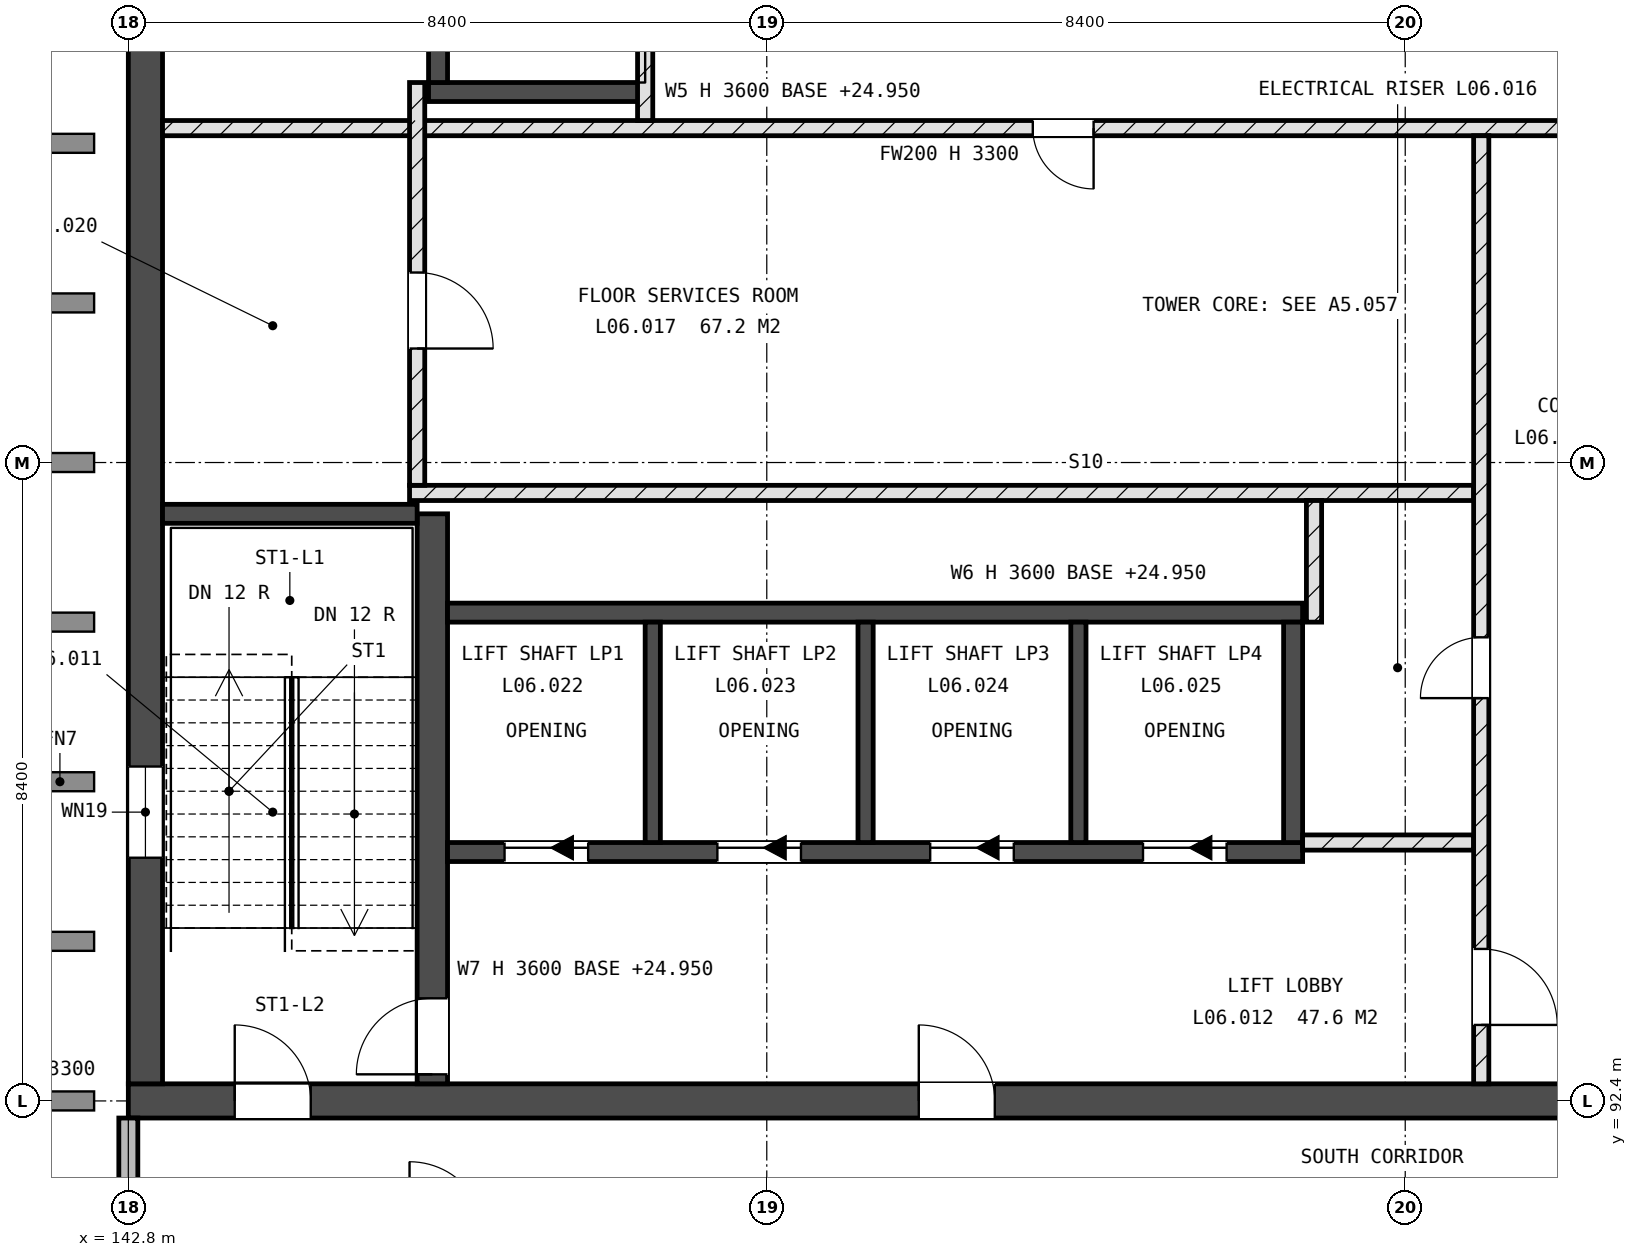
"""IFC4 building model, lengths in metres.
Left out: names, types, materials, properties, quantities, classifications, styles, units other than length and angle.
Written with IfcOpenShell. Run it as: python <this file> out.ifc"""

import sys

from ifc_helpers import new_model, si_unit, direction, frame, frame_2d, origin, place, context, subcontext, project, spatial, rectangle, extrude, element, fill, save


model = new_model("IFC4")
c1 = context("Model", 3, precision=1e-05, world=origin(), true_north=direction((0.0, 1.0)))
c2 = subcontext(c1, "Body", "Model", "MODEL_VIEW")
j1 = project(units=[si_unit("LENGTHUNIT", "METRE"), si_unit("PLANEANGLEUNIT", "RADIAN")], contexts=[c1])
p1 = place(None, origin())
s1 = spatial("IfcSite", under=j1, at=p1, CompositionType="ELEMENT")
p2 = place(p1, origin())
s2 = spatial("IfcBuilding", under=s1, at=p2, CompositionType="ELEMENT")
p3 = place(p2, frame((0.0, 0.0, 25.2)))
s3 = spatial("IfcBuildingStorey", under=s2, at=p3, CompositionType="ELEMENT", Elevation=25.2)
p4 = place(p3, frame((142.8, 92.4, -0.25), z_axis=(0.0, 0.0, 1.0), x_axis=(1.0, 0.0, 0.0)))
e1 = element("IfcWall", 1, at=p4, inside=s3, PredefinedType="SHEAR", context=c2, shape_type="SweptSolid", body=[
    extrude(rectangle(XDim=25.2, YDim=0.45, at=frame_2d((12.6, 0.0))), origin(), (0.0, 0.0, 1.0), 3.6),
])
p5 = place(p4, frame((1.4, 0.0, 0.25)))
e2 = element("IfcOpeningElement", 2, at=p5, cuts=e1, PredefinedType="OPENING", context=c2, shape_type="SweptSolid", body=[
    extrude(rectangle(XDim=1.0, YDim=2.1, at=frame_2d((0.5, 1.05))), frame((0.0, 0.235, 0.0), z_axis=(0.0, -1.0, 0.0), x_axis=(1.0, 0.0, 0.0)), (0.0, 0.0, 1.0), 0.47),
])
p6 = place(p4, frame((19.1, 0.0, 0.25)))
e3 = element("IfcOpeningElement", 3, at=p6, cuts=e1, PredefinedType="OPENING", context=c2, shape_type="SweptSolid", body=[
    extrude(rectangle(XDim=1.0, YDim=2.1, at=frame_2d((0.5, 1.05))), frame((0.0, 0.235, 0.0), z_axis=(0.0, -1.0, 0.0), x_axis=(1.0, 0.0, 0.0)), (0.0, 0.0, 1.0), 0.47),
])
p7 = place(p4, frame((10.4, 0.0, 0.25)))
e4 = element("IfcOpeningElement", 4, at=p7, cuts=e1, PredefinedType="OPENING", context=c2, shape_type="SweptSolid", body=[
    extrude(rectangle(XDim=1.0, YDim=2.1, at=frame_2d((0.5, 1.05))), frame((0.0, 0.235, 0.0), z_axis=(0.0, -1.0, 0.0), x_axis=(1.0, 0.0, 0.0)), (0.0, 0.0, 1.0), 0.47),
])
p8 = place(p3, frame((143.025, 92.625, -0.25), z_axis=(0.0, 0.0, 1.0), x_axis=(0.0, 1.0, 0.0)))
e5 = element("IfcWall", 5, at=p8, inside=s3, PredefinedType="SHEAR", context=c2, shape_type="SweptSolid", body=[
    extrude(rectangle(XDim=16.35, YDim=0.45, at=frame_2d((8.175, 0.0))), origin(), (0.0, 0.0, 1.0), 3.6),
])
p9 = place(p8, frame((2.975, 0.0, 1.85)))
e6 = element("IfcOpeningElement", 6, at=p9, cuts=e5, PredefinedType="OPENING", context=c2, shape_type="SweptSolid", body=[
    extrude(rectangle(XDim=1.2, YDim=0.9, at=frame_2d((0.6, 0.45))), frame((0.0, 0.235, 0.0), z_axis=(0.0, -1.0, 0.0), x_axis=(1.0, 0.0, 0.0)), (0.0, 0.0, 1.0), 0.47),
])
p10 = place(p3, frame((146.8, 92.625, -0.25), z_axis=(0.0, 0.0, 1.0), x_axis=(0.0, 1.0, 0.0)))
e7 = element("IfcWall", 7, at=p10, inside=s3, PredefinedType="SHEAR", context=c2, shape_type="SweptSolid", body=[
    extrude(rectangle(XDim=7.5, YDim=0.4, at=frame_2d((3.75, 0.0))), origin(), (0.0, 0.0, 1.0), 3.6),
])
p11 = place(p10, frame((0.125, 0.0, 0.25)))
e8 = element("IfcOpeningElement", 8, at=p11, cuts=e7, PredefinedType="OPENING", context=c2, shape_type="SweptSolid", body=[
    extrude(rectangle(XDim=1.0, YDim=2.1, at=frame_2d((0.5, 1.05))), frame((0.0, 0.21, 0.0), z_axis=(0.0, -1.0, 0.0), x_axis=(1.0, 0.0, 0.0)), (0.0, 0.0, 1.0), 0.42),
])
p12 = place(p3, frame((143.25, 100.125, -0.25), z_axis=(0.0, 0.0, 1.0), x_axis=(1.0, 0.0, 0.0)))
e9 = element("IfcWall", 9, at=p12, inside=s3, PredefinedType="SHEAR", context=c2, shape_type="SweptSolid", body=[
    extrude(rectangle(XDim=3.35, YDim=0.25, at=frame_2d((1.675, 0.0))), origin(), (0.0, 0.0, 1.0), 3.6),
])
p13 = place(p3, frame((147.0, 95.675, -0.25), z_axis=(0.0, 0.0, 1.0), x_axis=(1.0, 0.0, 0.0)))
e10 = element("IfcWall", 10, at=p13, inside=s3, PredefinedType="SHEAR", context=c2, shape_type="SweptSolid", body=[
    extrude(rectangle(XDim=11.25, YDim=0.25, at=frame_2d((5.625, 0.0))), origin(), (0.0, 0.0, 1.0), 3.6),
])
p14 = place(p13, frame((0.75, 0.0, 0.25)))
e11 = element("IfcOpeningElement", 11, at=p14, cuts=e10, PredefinedType="OPENING", context=c2, shape_type="SweptSolid", body=[
    extrude(rectangle(XDim=1.1, YDim=2.1, at=frame_2d((0.55, 1.05))), frame((0.0, 0.135, 0.0), z_axis=(0.0, -1.0, 0.0), x_axis=(1.0, 0.0, 0.0)), (0.0, 0.0, 1.0), 0.27),
])
p15 = place(p13, frame((3.55, 0.0, 0.25)))
e12 = element("IfcOpeningElement", 12, at=p15, cuts=e10, PredefinedType="OPENING", context=c2, shape_type="SweptSolid", body=[
    extrude(rectangle(XDim=1.1, YDim=2.1, at=frame_2d((0.55, 1.05))), frame((0.0, 0.135, 0.0), z_axis=(0.0, -1.0, 0.0), x_axis=(1.0, 0.0, 0.0)), (0.0, 0.0, 1.0), 0.27),
])
p16 = place(p13, frame((6.35, 0.0, 0.25)))
e13 = element("IfcOpeningElement", 13, at=p16, cuts=e10, PredefinedType="OPENING", context=c2, shape_type="SweptSolid", body=[
    extrude(rectangle(XDim=1.1, YDim=2.1, at=frame_2d((0.55, 1.05))), frame((0.0, 0.135, 0.0), z_axis=(0.0, -1.0, 0.0), x_axis=(1.0, 0.0, 0.0)), (0.0, 0.0, 1.0), 0.27),
])
p17 = place(p13, frame((9.15, 0.0, 0.25)))
e14 = element("IfcOpeningElement", 14, at=p17, cuts=e10, PredefinedType="OPENING", context=c2, shape_type="SweptSolid", body=[
    extrude(rectangle(XDim=1.1, YDim=2.1, at=frame_2d((0.55, 1.05))), frame((0.0, 0.135, 0.0), z_axis=(0.0, -1.0, 0.0), x_axis=(1.0, 0.0, 0.0)), (0.0, 0.0, 1.0), 0.27),
])
p18 = place(p3, frame((147.0, 98.825, -0.25), z_axis=(0.0, 0.0, 1.0), x_axis=(1.0, 0.0, 0.0)))
e15 = element("IfcWall", 15, at=p18, inside=s3, PredefinedType="SHEAR", context=c2, shape_type="SweptSolid", body=[
    extrude(rectangle(XDim=11.25, YDim=0.25, at=frame_2d((5.625, 0.0))), origin(), (0.0, 0.0, 1.0), 3.6),
])
p19 = place(p3, frame((158.125, 95.8, -0.25), z_axis=(0.0, 0.0, 1.0), x_axis=(0.0, 1.0, 0.0)))
e16 = element("IfcWall", 16, at=p19, inside=s3, PredefinedType="SHEAR", context=c2, shape_type="SweptSolid", body=[
    extrude(rectangle(XDim=2.9, YDim=0.25, at=frame_2d((1.45, 0.0))), origin(), (0.0, 0.0, 1.0), 3.6),
])
for number, where, z_axis, x_axis in (
    (17, (149.7, 95.8, -0.25), (0.0, 0.0, 1.0), (0.0, 1.0, 0.0)),
    (18, (152.5, 95.8, -0.25), (0.0, 0.0, 1.0), (0.0, 1.0, 0.0)),
    (19, (155.3, 95.8, -0.25), (0.0, 0.0, 1.0), (0.0, 1.0, 0.0)),
):
    element("IfcWall", number, at=place(p3, frame(where, z_axis=z_axis, x_axis=x_axis)), inside=s3, PredefinedType="SHEAR", context=c2, shape_type="SweptSolid", body=[
        extrude(rectangle(XDim=2.9, YDim=0.2, at=frame_2d((1.45, 0.0))), origin(), (0.0, 0.0, 1.0), 3.6),
    ])
p20 = place(p3, frame((146.75, 105.675, -0.25), z_axis=(0.0, 0.0, 1.0), x_axis=(1.0, 0.0, 0.0)))
e20 = element("IfcWall", 20, at=p20, inside=s3, PredefinedType="SHEAR", context=c2, shape_type="SweptSolid", body=[
    extrude(rectangle(XDim=2.85, YDim=0.25, at=frame_2d((1.425, 0.0))), origin(), (0.0, 0.0, 1.0), 3.6),
])
p21 = place(p3, frame((146.875, 105.8, -0.25), z_axis=(0.0, 0.0, 1.0), x_axis=(0.0, 1.0, 0.0)))
e21 = element("IfcWall", 21, at=p21, inside=s3, PredefinedType="SHEAR", context=c2, shape_type="SweptSolid", body=[
    extrude(rectangle(XDim=2.9, YDim=0.25, at=frame_2d((1.45, 0.0))), origin(), (0.0, 0.0, 1.0), 3.6),
])
p22 = place(p3, frame((142.8, 84.45, 0.0), z_axis=(0.0, 0.0, 1.0), x_axis=(0.0, 1.0, 0.0)))
e22 = element("IfcWall", 22, at=p22, inside=s3, PredefinedType="STANDARD", context=c2, shape_type="SweptSolid", body=[
    extrude(rectangle(XDim=7.725, YDim=0.25, at=frame_2d((3.863, 0.0))), origin(), (0.0, 0.0, 1.0), 3.3),
])
p23 = place(p22, frame((2.25, 0.0, 2.1)))
e23 = element("IfcOpeningElement", 23, at=p23, cuts=e22, PredefinedType="OPENING", context=c2, shape_type="SweptSolid", body=[
    extrude(rectangle(XDim=0.9, YDim=0.6, at=frame_2d((0.45, 0.3))), frame((0.0, 0.135, 0.0), z_axis=(0.0, -1.0, 0.0), x_axis=(1.0, 0.0, 0.0)), (0.0, 0.0, 1.0), 0.27),
])
p24 = place(p3, frame((158.25, 95.8, 0.0), z_axis=(0.0, 0.0, 1.0), x_axis=(1.0, 0.0, 0.0)))
e24 = element("IfcWall", 24, at=p24, inside=s3, PredefinedType="SOLIDWALL", context=c2, shape_type="SweptSolid", body=[
    extrude(rectangle(XDim=2.25, YDim=0.2, at=frame_2d((1.125, 0.0))), origin(), (0.0, 0.0, 1.0), 3.3),
])
p25 = place(p3, frame((146.5, 100.4, 0.0), z_axis=(0.0, 0.0, 1.0), x_axis=(1.0, 0.0, 0.0)))
e25 = element("IfcWall", 25, at=p25, inside=s3, PredefinedType="SOLIDWALL", context=c2, shape_type="SweptSolid", body=[
    extrude(rectangle(XDim=14.0, YDim=0.2, at=frame_2d((7.0, 0.0))), origin(), (0.0, 0.0, 1.0), 3.3),
])
p26 = place(p3, frame((143.25, 105.2, 0.0), z_axis=(0.0, 0.0, 1.0), x_axis=(1.0, 0.0, 0.0)))
e26 = element("IfcWall", 26, at=p26, inside=s3, PredefinedType="SOLIDWALL", context=c2, shape_type="SweptSolid", body=[
    extrude(rectangle(XDim=20.7, YDim=0.2, at=frame_2d((10.35, 0.0))), origin(), (0.0, 0.0, 1.0), 3.3),
])
p27 = place(p26, frame((11.45, 0.0, 0.0)))
e27 = element("IfcOpeningElement", 27, at=p27, cuts=e26, PredefinedType="OPENING", context=c2, shape_type="SweptSolid", body=[
    extrude(rectangle(XDim=0.8, YDim=2.1, at=frame_2d((0.4, 1.05))), frame((0.0, 0.11, 0.0), z_axis=(0.0, -1.0, 0.0), x_axis=(1.0, 0.0, 0.0)), (0.0, 0.0, 1.0), 0.22),
])
p28 = place(p26, frame((18.75, 0.0, 0.0)))
e28 = element("IfcOpeningElement", 28, at=p28, cuts=e26, PredefinedType="OPENING", context=c2, shape_type="SweptSolid", body=[
    extrude(rectangle(XDim=1.0, YDim=2.1, at=frame_2d((0.5, 1.05))), frame((0.0, 0.11, 0.0), z_axis=(0.0, -1.0, 0.0), x_axis=(1.0, 0.0, 0.0)), (0.0, 0.0, 1.0), 0.22),
])
p29 = place(p3, frame((146.6, 100.5, 0.0), z_axis=(0.0, 0.0, 1.0), x_axis=(0.0, 1.0, 0.0)))
e29 = element("IfcWall", 29, at=p29, inside=s3, PredefinedType="SOLIDWALL", context=c2, shape_type="SweptSolid", body=[
    extrude(rectangle(XDim=5.3, YDim=0.2, at=frame_2d((2.65, 0.0))), origin(), (0.0, 0.0, 1.0), 3.3),
])
p30 = place(p29, frame((1.8, 0.0, 0.0)))
e30 = element("IfcOpeningElement", 30, at=p30, cuts=e29, PredefinedType="OPENING", context=c2, shape_type="SweptSolid", body=[
    extrude(rectangle(XDim=1.0, YDim=2.1, at=frame_2d((0.5, 1.05))), frame((0.0, 0.11, 0.0), z_axis=(0.0, -1.0, 0.0), x_axis=(1.0, 0.0, 0.0)), (0.0, 0.0, 1.0), 0.22),
])
p31 = place(p3, frame((149.6, 105.3, 0.0), z_axis=(0.0, 0.0, 1.0), x_axis=(0.0, 1.0, 0.0)))
e31 = element("IfcWall", 31, at=p31, inside=s3, PredefinedType="SOLIDWALL", context=c2, shape_type="SweptSolid", body=[
    extrude(rectangle(XDim=3.675, YDim=0.2, at=frame_2d((1.837, 0.0))), origin(), (0.0, 0.0, 1.0), 3.3),
])
p32 = place(p31, frame((1.4, 0.0, 0.0)))
e32 = element("IfcOpeningElement", 32, at=p32, cuts=e31, PredefinedType="OPENING", context=c2, shape_type="SweptSolid", body=[
    extrude(rectangle(XDim=1.1, YDim=2.1, at=frame_2d((0.55, 1.05))), frame((0.0, 0.11, 0.0), z_axis=(0.0, -1.0, 0.0), x_axis=(1.0, 0.0, 0.0)), (0.0, 0.0, 1.0), 0.22),
])
p33 = place(p3, frame((158.4, 98.7, 0.0), z_axis=(0.0, 0.0, 1.0), x_axis=(0.0, 1.0, 0.0)))
e33 = element("IfcWall", 33, at=p33, inside=s3, PredefinedType="SOLIDWALL", context=c2, shape_type="SweptSolid", body=[
    extrude(rectangle(XDim=1.6, YDim=0.2, at=frame_2d((0.8, 0.0))), origin(), (0.0, 0.0, 1.0), 3.3),
])
p34 = place(p3, frame((160.6, 92.625, 0.0), z_axis=(0.0, 0.0, 1.0), x_axis=(0.0, 1.0, 0.0)))
e34 = element("IfcWall", 34, at=p34, inside=s3, PredefinedType="SOLIDWALL", context=c2, shape_type="SweptSolid", body=[
    extrude(rectangle(XDim=12.475, YDim=0.2, at=frame_2d((6.238, 0.0))), origin(), (0.0, 0.0, 1.0), 3.3),
])
p35 = place(p34, frame((5.075, 0.0, 0.0)))
e35 = element("IfcOpeningElement", 35, at=p35, cuts=e34, PredefinedType="OPENING", context=c2, shape_type="SweptSolid", body=[
    extrude(rectangle(XDim=0.8, YDim=2.1, at=frame_2d((0.4, 1.05))), frame((0.0, 0.11, 0.0), z_axis=(0.0, -1.0, 0.0), x_axis=(1.0, 0.0, 0.0)), (0.0, 0.0, 1.0), 0.22),
])
p36 = place(p34, frame((0.775, 0.0, 0.0)))
e36 = element("IfcOpeningElement", 36, at=p36, cuts=e34, PredefinedType="OPENING", context=c2, shape_type="SweptSolid", body=[
    extrude(rectangle(XDim=1.0, YDim=2.1, at=frame_2d((0.5, 1.05))), frame((0.0, 0.11, 0.0), z_axis=(0.0, -1.0, 0.0), x_axis=(1.0, 0.0, 0.0)), (0.0, 0.0, 1.0), 0.22),
])
p37 = place(p9, origin())
e37 = element("IfcWindow", 37, at=p37, inside=s3, PartitioningType="SINGLE_PANEL", PredefinedType="WINDOW", context=c2, shape_type="SweptSolid", body=[
    extrude(rectangle(XDim=1.2, YDim=0.9, at=frame_2d((0.6, 0.45))), frame((0.0, 0.03, 0.0), z_axis=(0.0, -1.0, 0.0), x_axis=(1.0, 0.0, 0.0)), (0.0, 0.0, 1.0), 0.06),
])
fill(e6, e37)
p38 = place(p14, origin())
e38 = element("IfcDoor", 38, at=p38, inside=s3, OperationType="SLIDING_TO_LEFT", PredefinedType="DOOR", context=c2, shape_type="SweptSolid", body=[
    extrude(rectangle(XDim=1.1, YDim=2.1, at=frame_2d((0.55, 1.05))), frame((0.0, 0.025, 0.0), z_axis=(0.0, -1.0, 0.0), x_axis=(1.0, 0.0, 0.0)), (0.0, 0.0, 1.0), 0.05),
])
fill(e11, e38)
p39 = place(p15, origin())
e39 = element("IfcDoor", 39, at=p39, inside=s3, OperationType="SLIDING_TO_LEFT", PredefinedType="DOOR", context=c2, shape_type="SweptSolid", body=[
    extrude(rectangle(XDim=1.1, YDim=2.1, at=frame_2d((0.55, 1.05))), frame((0.0, 0.025, 0.0), z_axis=(0.0, -1.0, 0.0), x_axis=(1.0, 0.0, 0.0)), (0.0, 0.0, 1.0), 0.05),
])
fill(e12, e39)
p40 = place(p16, origin())
e40 = element("IfcDoor", 40, at=p40, inside=s3, OperationType="SLIDING_TO_LEFT", PredefinedType="DOOR", context=c2, shape_type="SweptSolid", body=[
    extrude(rectangle(XDim=1.1, YDim=2.1, at=frame_2d((0.55, 1.05))), frame((0.0, 0.025, 0.0), z_axis=(0.0, -1.0, 0.0), x_axis=(1.0, 0.0, 0.0)), (0.0, 0.0, 1.0), 0.05),
])
fill(e13, e40)
p41 = place(p17, origin())
e41 = element("IfcDoor", 41, at=p41, inside=s3, OperationType="SLIDING_TO_LEFT", PredefinedType="DOOR", context=c2, shape_type="SweptSolid", body=[
    extrude(rectangle(XDim=1.1, YDim=2.1, at=frame_2d((0.55, 1.05))), frame((0.0, 0.025, 0.0), z_axis=(0.0, -1.0, 0.0), x_axis=(1.0, 0.0, 0.0)), (0.0, 0.0, 1.0), 0.05),
])
fill(e14, e41)
p42 = place(p5, origin())
e42 = element("IfcDoor", 42, at=p42, inside=s3, OperationType="SINGLE_SWING_RIGHT", PredefinedType="DOOR", context=c2, shape_type="SweptSolid", body=[
    extrude(rectangle(XDim=1.0, YDim=2.1, at=frame_2d((0.5, 1.05))), frame((0.0, 0.025, 0.0), z_axis=(0.0, -1.0, 0.0), x_axis=(1.0, 0.0, 0.0)), (0.0, 0.0, 1.0), 0.05),
])
fill(e2, e42)
p43 = place(p11, origin())
e43 = element("IfcDoor", 43, at=p43, inside=s3, OperationType="SINGLE_SWING_RIGHT", PredefinedType="DOOR", context=c2, shape_type="SweptSolid", body=[
    extrude(rectangle(XDim=1.0, YDim=2.1, at=frame_2d((0.5, 1.05))), frame((0.0, 0.025, 0.0), z_axis=(0.0, -1.0, 0.0), x_axis=(1.0, 0.0, 0.0)), (0.0, 0.0, 1.0), 0.05),
])
fill(e8, e43)
p44 = place(p35, origin())
e44 = element("IfcDoor", 44, at=p44, inside=s3, OperationType="SINGLE_SWING_RIGHT", PredefinedType="DOOR", context=c2, shape_type="SweptSolid", body=[
    extrude(rectangle(XDim=0.8, YDim=2.1, at=frame_2d((0.4, 1.05))), frame((0.0, 0.025, 0.0), z_axis=(0.0, -1.0, 0.0), x_axis=(1.0, 0.0, 0.0)), (0.0, 0.0, 1.0), 0.05),
])
fill(e35, e44)
p45 = place(p27, origin())
e45 = element("IfcDoor", 45, at=p45, inside=s3, OperationType="SINGLE_SWING_RIGHT", PredefinedType="DOOR", context=c2, shape_type="SweptSolid", body=[
    extrude(rectangle(XDim=0.8, YDim=2.1, at=frame_2d((0.4, 1.05))), frame((0.0, 0.025, 0.0), z_axis=(0.0, -1.0, 0.0), x_axis=(1.0, 0.0, 0.0)), (0.0, 0.0, 1.0), 0.05),
])
fill(e27, e45)
p46 = place(p30, origin())
e46 = element("IfcDoor", 46, at=p46, inside=s3, OperationType="SINGLE_SWING_LEFT", PredefinedType="DOOR", context=c2, shape_type="SweptSolid", body=[
    extrude(rectangle(XDim=1.0, YDim=2.1, at=frame_2d((0.5, 1.05))), frame((0.0, 0.025, 0.0), z_axis=(0.0, -1.0, 0.0), x_axis=(1.0, 0.0, 0.0)), (0.0, 0.0, 1.0), 0.05),
])
fill(e30, e46)
p47 = place(p7, origin())
e47 = element("IfcDoor", 47, at=p47, inside=s3, OperationType="SINGLE_SWING_RIGHT", PredefinedType="DOOR", context=c2, shape_type="SweptSolid", body=[
    extrude(rectangle(XDim=1.0, YDim=2.1, at=frame_2d((0.5, 1.05))), frame((0.0, 0.025, 0.0), z_axis=(0.0, -1.0, 0.0), x_axis=(1.0, 0.0, 0.0)), (0.0, 0.0, 1.0), 0.05),
])
fill(e4, e47)
p48 = place(p36, origin())
e48 = element("IfcDoor", 48, at=p48, inside=s3, OperationType="SINGLE_SWING_LEFT", PredefinedType="DOOR", context=c2, shape_type="SweptSolid", body=[
    extrude(rectangle(XDim=1.0, YDim=2.1, at=frame_2d((0.5, 1.05))), frame((0.0, 0.025, 0.0), z_axis=(0.0, -1.0, 0.0), x_axis=(1.0, 0.0, 0.0)), (0.0, 0.0, 1.0), 0.05),
])
fill(e36, e48)
save(model, sys.argv[1])
